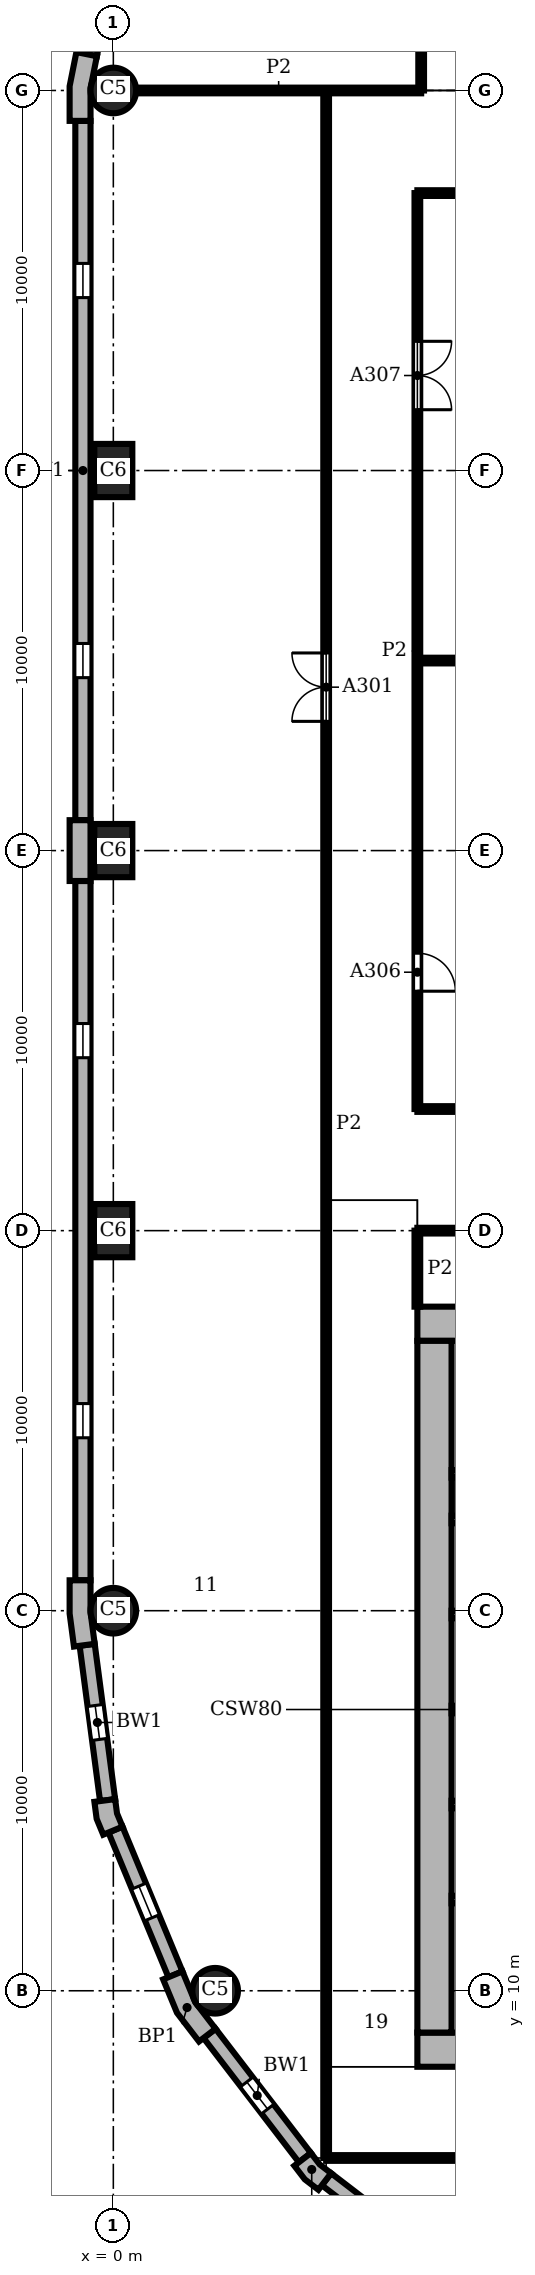
"""IFC4 building model, lengths in metres.
Left out: names, types, materials, properties, quantities, classifications, styles, units other than length and angle.
Written with IfcOpenShell. Run it as: python <this file> out.ifc"""

import sys

from ifc_helpers import new_model, si_unit, direction, frame, frame_2d, origin, origin_2d, place, context, subcontext, project, spatial, polyline, rectangle, circle, outline, extrude, element, fill, save


model = new_model("IFC4")
c1 = context("Model", 3, precision=1e-05, world=origin(), true_north=direction((0.0, 1.0)))
c2 = subcontext(c1, "Body", "Model", "MODEL_VIEW")
j1 = project(units=[si_unit("LENGTHUNIT", "METRE"), si_unit("PLANEANGLEUNIT", "RADIAN")], contexts=[c1])
p1 = place(None, origin())
s1 = spatial("IfcSite", under=j1, at=p1, CompositionType="ELEMENT")
p2 = place(p1, origin())
s2 = spatial("IfcBuilding", under=s1, at=p2, CompositionType="ELEMENT")
p3 = place(p2, frame((0.0, 0.0, 35.4)))
s3 = spatial("IfcBuildingStorey", under=s2, at=p3, CompositionType="ELEMENT", Elevation=35.4)
p4 = place(p3, frame((0.0, 60.0, 0.0), z_axis=(0.0, 0.0, 1.0), x_axis=(1.0, 0.0, 0.0)))
e1 = element("IfcColumn", 1, at=p4, inside=s3, PredefinedType="COLUMN", context=c2, shape_type="SweptSolid", body=[
    extrude(circle(Radius=0.6, at=origin_2d()), origin(), (0.0, 0.0, 1.0), 3.9),
])
for number, where, z_axis, x_axis in (
    (2, (0.0, 50.0, 0.0), (0.0, 0.0, 1.0), (0.0, 1.0, 0.0)),
    (3, (0.0, 40.0, 0.0), (0.0, 0.0, 1.0), (0.0, 1.0, 0.0)),
    (4, (0.0, 30.0, 0.0), (0.0, 0.0, 1.0), (0.0, 1.0, 0.0)),
):
    element("IfcColumn", number, at=place(p3, frame(where, z_axis=z_axis, x_axis=x_axis)), inside=s3, PredefinedType="COLUMN", context=c2, shape_type="SweptSolid", body=[
        extrude(rectangle(XDim=1.4, YDim=1.0, at=origin_2d()), origin(), (0.0, 0.0, 1.0), 3.9),
    ])
for number, where, z_axis, x_axis in (
    (5, (0.0, 20.0, 0.0), (0.0, 0.0, 1.0), (1.0, 0.0, 0.0)),
    (6, (2.679, 10.0, 0.0), (0.0, 0.0, 1.0), (1.0, 0.0, 0.0)),
):
    element("IfcColumn", number, at=place(p3, frame(where, z_axis=z_axis, x_axis=x_axis)), inside=s3, PredefinedType="COLUMN", context=c2, shape_type="SweptSolid", body=[
        extrude(circle(Radius=0.6, at=origin_2d()), origin(), (0.0, 0.0, 1.0), 3.9),
    ])
for number, where, z_axis, x_axis in (
    (7, (8.0, 8.45, 0.0), (0.0, 0.0, 1.0), (1.0, 0.0, 0.0)),
    (8, (28.0, 27.55, 0.0), (0.0, 0.0, 1.0), (-1.0, 0.0, 0.0)),
):
    element("IfcWall", number, at=place(p3, frame(where, z_axis=z_axis, x_axis=x_axis)), inside=s3, PredefinedType="SHEAR", context=c2, shape_type="SweptSolid", body=[
        extrude(rectangle(XDim=20.0, YDim=0.9, at=frame_2d((10.0, 0.0))), origin(), (0.0, 0.0, 1.0), 3.9),
    ])
p5 = place(p3, frame((8.45, 27.1, 0.0), z_axis=(0.0, 0.0, 1.0), x_axis=(0.0, -1.0, 0.0)))
e9 = element("IfcWall", 9, at=p5, inside=s3, PredefinedType="SHEAR", context=c2, shape_type="SweptSolid", body=[
    extrude(rectangle(XDim=18.2, YDim=0.9, at=frame_2d((9.1, 0.0))), origin(), (0.0, 0.0, 1.0), 3.9),
])
p6 = place(p3, origin())
e10 = element("IfcWall", 10, at=p6, inside=s3, PredefinedType="SOLIDWALL", context=c2, shape_type="SweptSolid", body=[
    extrude(outline(polyline([(-0.825, 60.98), (-0.972, 61.009), (-1.15, 60.113), (-1.15, 59.2), (-1.0, 59.2), (-0.6, 59.2), (-0.6, 60.059), (-0.432, 60.902), (-0.825, 60.98)])), origin(), (0.0, 0.0, 1.0), 3.9),
])
e11 = element("IfcWall", 11, at=p6, inside=s3, PredefinedType="SOLIDWALL", context=c2, shape_type="SweptSolid", body=[
    extrude(outline(polyline([(-1.0, 40.8), (-1.15, 40.8), (-1.15, 40.0), (-1.15, 39.2), (-1.0, 39.2), (-0.6, 39.2), (-0.6, 40.0), (-0.6, 40.8), (-1.0, 40.8)])), origin(), (0.0, 0.0, 1.0), 3.9),
])
e12 = element("IfcWall", 12, at=p6, inside=s3, PredefinedType="SOLIDWALL", context=c2, shape_type="SweptSolid", body=[
    extrude(outline(polyline([(-1.0, 20.8), (-1.15, 20.8), (-1.15, 19.925), (-1.036, 19.057), (-0.887, 19.076), (-0.49, 19.128), (-0.6, 19.961), (-0.6, 20.8), (-1.0, 20.8)])), origin(), (0.0, 0.0, 1.0), 3.9),
])
e13 = element("IfcWall", 13, at=p6, inside=s3, PredefinedType="SOLIDWALL", context=c2, shape_type="SweptSolid", body=[
    extrude(outline(polyline([(-0.349, 14.99), (-0.498, 14.971), (-0.439, 14.523), (-0.266, 14.106), (-0.128, 14.164), (0.242, 14.317), (0.097, 14.667), (0.047, 15.043), (-0.349, 14.99)])), origin(), (0.0, 0.0, 1.0), 3.9),
])
e14 = element("IfcWall", 14, at=p6, inside=s3, PredefinedType="SOLIDWALL", context=c2, shape_type="SweptSolid", body=[
    extrude(outline(polyline([(1.449, 10.356), (1.311, 10.299), (1.675, 9.42), (2.254, 8.665), (2.373, 8.757), (2.69, 9.0), (2.155, 9.698), (1.819, 10.51), (1.449, 10.356)])), origin(), (0.0, 0.0, 1.0), 3.9),
])
e15 = element("IfcWall", 15, at=p6, inside=s3, PredefinedType="SOLIDWALL", context=c2, shape_type="SweptSolid", body=[
    extrude(outline(polyline([(4.882, 5.487), (4.763, 5.396), (5.038, 5.038), (5.396, 4.763), (5.487, 4.882), (5.731, 5.199), (5.43, 5.43), (5.199, 5.731), (4.882, 5.487)])), origin(), (0.0, 0.0, 1.0), 3.9),
])
p7 = place(p3, frame((0.299, 65.602, 0.0), z_axis=(0.0, 0.0, 1.0), x_axis=(-0.195098533057, -0.98078364709, 0.0)))
e16 = element("IfcWall", 16, at=p7, inside=s3, PredefinedType="SOLIDWALL", context=c2, shape_type="SweptSolid", body=[
    extrude(rectangle(XDim=4.753, YDim=0.4, at=frame_2d((2.376, 0.0))), origin(), (0.0, 0.0, 1.0), 3.9),
])
p8 = place(p7, frame((0.226, 0.0, 0.9)))
e17 = element("IfcOpeningElement", 17, at=p8, cuts=e16, PredefinedType="OPENING", context=c2, shape_type="SweptSolid", body=[
    extrude(rectangle(XDim=4.3, YDim=2.35, at=frame_2d((2.15, 1.175))), frame((0.0, 0.21, 0.0), z_axis=(0.0, -1.0, 0.0), x_axis=(1.0, 0.0, 0.0)), (0.0, 0.0, 1.0), 0.42),
])
p9 = place(p3, frame((-0.8, 59.2, 0.0), z_axis=(0.0, 0.0, 1.0), x_axis=(0.0, -1.0, 0.0)))
e18 = element("IfcWall", 18, at=p9, inside=s3, PredefinedType="SOLIDWALL", context=c2, shape_type="SweptSolid", body=[
    extrude(rectangle(XDim=18.4, YDim=0.4, at=frame_2d((9.2, 0.0))), origin(), (0.0, 0.0, 1.0), 3.9),
])
p10 = place(p9, frame((3.75, 0.0, 0.9)))
e19 = element("IfcOpeningElement", 19, at=p10, cuts=e18, PredefinedType="OPENING", context=c2, shape_type="SweptSolid", body=[
    extrude(rectangle(XDim=0.9, YDim=2.35, at=frame_2d((0.45, 1.175))), frame((0.0, 0.21, 0.0), z_axis=(0.0, -1.0, 0.0), x_axis=(1.0, 0.0, 0.0)), (0.0, 0.0, 1.0), 0.42),
])
p11 = place(p9, frame((13.75, 0.0, 0.9)))
e20 = element("IfcOpeningElement", 20, at=p11, cuts=e18, PredefinedType="OPENING", context=c2, shape_type="SweptSolid", body=[
    extrude(rectangle(XDim=0.9, YDim=2.35, at=frame_2d((0.45, 1.175))), frame((0.0, 0.21, 0.0), z_axis=(0.0, -1.0, 0.0), x_axis=(1.0, 0.0, 0.0)), (0.0, 0.0, 1.0), 0.42),
])
p12 = place(p3, frame((-0.8, 39.2, 0.0), z_axis=(0.0, 0.0, 1.0), x_axis=(0.0, -1.0, 0.0)))
e21 = element("IfcWall", 21, at=p12, inside=s3, PredefinedType="SOLIDWALL", context=c2, shape_type="SweptSolid", body=[
    extrude(rectangle(XDim=18.4, YDim=0.4, at=frame_2d((9.2, 0.0))), origin(), (0.0, 0.0, 1.0), 3.9),
])
p13 = place(p12, frame((3.75, 0.0, 0.9)))
e22 = element("IfcOpeningElement", 22, at=p13, cuts=e21, PredefinedType="OPENING", context=c2, shape_type="SweptSolid", body=[
    extrude(rectangle(XDim=0.9, YDim=2.35, at=frame_2d((0.45, 1.175))), frame((0.0, 0.21, 0.0), z_axis=(0.0, -1.0, 0.0), x_axis=(1.0, 0.0, 0.0)), (0.0, 0.0, 1.0), 0.42),
])
p14 = place(p12, frame((13.75, 0.0, 0.9)))
e23 = element("IfcOpeningElement", 23, at=p14, cuts=e21, PredefinedType="OPENING", context=c2, shape_type="SweptSolid", body=[
    extrude(rectangle(XDim=0.9, YDim=2.35, at=frame_2d((0.45, 1.175))), frame((0.0, 0.21, 0.0), z_axis=(0.0, -1.0, 0.0), x_axis=(1.0, 0.0, 0.0)), (0.0, 0.0, 1.0), 0.42),
])
p15 = place(p3, frame((-0.689, 19.102, 0.0), z_axis=(0.0, 0.0, 1.0), x_axis=(0.130514280502, -0.991446429508, 0.0)))
e24 = element("IfcWall", 24, at=p15, inside=s3, PredefinedType="SOLIDWALL", context=c2, shape_type="SweptSolid", body=[
    extrude(rectangle(XDim=4.121, YDim=0.4, at=frame_2d((2.061, 0.0))), origin(), (0.0, 0.0, 1.0), 3.9),
])
p16 = place(p15, frame((1.611, 0.0, 0.9)))
e25 = element("IfcOpeningElement", 25, at=p16, cuts=e24, PredefinedType="OPENING", context=c2, shape_type="SweptSolid", body=[
    extrude(rectangle(XDim=0.9, YDim=2.35, at=frame_2d((0.45, 1.175))), frame((0.0, 0.21, 0.0), z_axis=(0.0, -1.0, 0.0), x_axis=(1.0, 0.0, 0.0)), (0.0, 0.0, 1.0), 0.42),
])
p17 = place(p3, frame((0.057, 14.24, 0.0), z_axis=(0.0, 0.0, 1.0), x_axis=(0.382721546029, -0.923863744394, 0.0)))
e26 = element("IfcWall", 26, at=p17, inside=s3, PredefinedType="SOLIDWALL", context=c2, shape_type="SweptSolid", body=[
    extrude(rectangle(XDim=4.121, YDim=0.4, at=frame_2d((2.061, 0.0))), origin(), (0.0, 0.0, 1.0), 3.9),
])
p18 = place(p17, frame((1.611, 0.0, 0.9)))
e27 = element("IfcOpeningElement", 27, at=p18, cuts=e26, PredefinedType="OPENING", context=c2, shape_type="SweptSolid", body=[
    extrude(rectangle(XDim=0.9, YDim=2.35, at=frame_2d((0.45, 1.175))), frame((0.0, 0.21, 0.0), z_axis=(0.0, -1.0, 0.0), x_axis=(1.0, 0.0, 0.0)), (0.0, 0.0, 1.0), 0.42),
])
p19 = place(p3, frame((2.532, 8.878, 0.0), z_axis=(0.0, 0.0, 1.0), x_axis=(0.608759824817, -0.793354571229, 0.0)))
e28 = element("IfcWall", 28, at=p19, inside=s3, PredefinedType="SOLIDWALL", context=c2, shape_type="SweptSolid", body=[
    extrude(rectangle(XDim=4.121, YDim=0.4, at=frame_2d((2.061, 0.0))), origin(), (0.0, 0.0, 1.0), 3.9),
])
p20 = place(p19, frame((1.611, 0.0, 0.9)))
e29 = element("IfcOpeningElement", 29, at=p20, cuts=e28, PredefinedType="OPENING", context=c2, shape_type="SweptSolid", body=[
    extrude(rectangle(XDim=0.9, YDim=2.35, at=frame_2d((0.45, 1.175))), frame((0.0, 0.21, 0.0), z_axis=(0.0, -1.0, 0.0), x_axis=(1.0, 0.0, 0.0)), (0.0, 0.0, 1.0), 0.42),
])
p21 = place(p3, frame((5.609, 5.041, 0.0), z_axis=(0.0, 0.0, 1.0), x_axis=(0.793354571229, -0.608759824817, 0.0)))
e30 = element("IfcWall", 30, at=p21, inside=s3, PredefinedType="SOLIDWALL", context=c2, shape_type="SweptSolid", body=[
    extrude(rectangle(XDim=4.121, YDim=0.4, at=frame_2d((2.061, 0.0))), origin(), (0.0, 0.0, 1.0), 3.9),
])
p22 = place(p21, frame((1.611, 0.0, 0.9)))
e31 = element("IfcOpeningElement", 31, at=p22, cuts=e30, PredefinedType="OPENING", context=c2, shape_type="SweptSolid", body=[
    extrude(rectangle(XDim=0.9, YDim=2.35, at=frame_2d((0.45, 1.175))), frame((0.0, 0.21, 0.0), z_axis=(0.0, -1.0, 0.0), x_axis=(1.0, 0.0, 0.0)), (0.0, 0.0, 1.0), 0.42),
])
p23 = place(p3, frame((8.9, 12.4, 0.0), z_axis=(0.0, 0.0, 1.0), x_axis=(1.0, 0.0, 0.0)))
e32 = element("IfcWall", 32, at=p23, inside=s3, PredefinedType="SHEAR", context=c2, shape_type="SweptSolid", body=[
    extrude(rectangle(XDim=4.9, YDim=0.2, at=frame_2d((2.45, 0.0))), origin(), (0.0, 0.0, 1.0), 3.58),
])
for number, where, z_axis, x_axis in (
    (33, (8.9, 14.9, 0.0), (0.0, 0.0, 1.0), (1.0, 0.0, 0.0)),
    (34, (8.9, 17.4, 0.0), (0.0, 0.0, 1.0), (1.0, 0.0, 0.0)),
    (35, (8.9, 19.9, 0.0), (0.0, 0.0, 1.0), (1.0, 0.0, 0.0)),
    (36, (8.9, 22.4, 0.0), (0.0, 0.0, 1.0), (1.0, 0.0, 0.0)),
):
    element("IfcWall", number, at=place(p3, frame(where, z_axis=z_axis, x_axis=x_axis)), inside=s3, PredefinedType="SHEAR", context=c2, shape_type="SweptSolid", body=[
        extrude(rectangle(XDim=2.8, YDim=0.2, at=frame_2d((1.4, 0.0))), origin(), (0.0, 0.0, 1.0), 3.58),
    ])
p24 = place(p3, frame((8.9, 23.6, 0.0), z_axis=(0.0, 0.0, 1.0), x_axis=(1.0, 0.0, 0.0)))
e37 = element("IfcWall", 37, at=p24, inside=s3, PredefinedType="SHEAR", context=c2, shape_type="SweptSolid", body=[
    extrude(rectangle(XDim=4.9, YDim=0.2, at=frame_2d((2.45, 0.0))), origin(), (0.0, 0.0, 1.0), 3.58),
])
p25 = place(p3, frame((5.6, 5.6, 0.0), z_axis=(0.0, 0.0, 1.0), x_axis=(0.0, 1.0, 0.0)))
e38 = element("IfcWall", 38, at=p25, inside=s3, PredefinedType="PARTITIONING", context=c2, shape_type="SweptSolid", body=[
    extrude(rectangle(XDim=54.4, YDim=0.15, at=frame_2d((27.2, 0.0))), origin(), (0.0, 0.0, 1.0), 3.58),
])
p26 = place(p25, frame((37.8, 0.0, 0.0)))
e39 = element("IfcOpeningElement", 39, at=p26, cuts=e38, PredefinedType="OPENING", context=c2, shape_type="SweptSolid", body=[
    extrude(rectangle(XDim=1.8, YDim=2.1, at=frame_2d((0.9, 1.05))), frame((0.0, 0.085, 0.0), z_axis=(0.0, -1.0, 0.0), x_axis=(1.0, 0.0, 0.0)), (0.0, 0.0, 1.0), 0.17),
])
p27 = place(p3, frame((8.0, 28.0, 0.0), z_axis=(0.0, 0.0, 1.0), x_axis=(0.0, 1.0, 0.0)))
e40 = element("IfcWall", 40, at=p27, inside=s3, PredefinedType="PARTITIONING", context=c2, shape_type="SweptSolid", body=[
    extrude(rectangle(XDim=2.0, YDim=0.15, at=frame_2d((1.0, 0.0))), origin(), (0.0, 0.0, 1.0), 3.58),
])
p28 = place(p3, frame((8.0, 33.2, 0.0), z_axis=(0.0, 0.0, 1.0), x_axis=(0.0, 1.0, 0.0)))
e41 = element("IfcWall", 41, at=p28, inside=s3, PredefinedType="PARTITIONING", context=c2, shape_type="SweptSolid", body=[
    extrude(rectangle(XDim=24.1, YDim=0.15, at=frame_2d((12.05, 0.0))), origin(), (0.0, 0.0, 1.0), 3.58),
])
p29 = place(p28, frame((3.1, 0.0, 0.0)))
e42 = element("IfcOpeningElement", 42, at=p29, cuts=e41, PredefinedType="OPENING", context=c2, shape_type="SweptSolid", body=[
    extrude(rectangle(XDim=1.0, YDim=2.1, at=frame_2d((0.5, 1.05))), frame((0.0, 0.085, 0.0), z_axis=(0.0, -1.0, 0.0), x_axis=(1.0, 0.0, 0.0)), (0.0, 0.0, 1.0), 0.17),
])
p30 = place(p28, frame((18.4, 0.0, 0.0)))
e43 = element("IfcOpeningElement", 43, at=p30, cuts=e41, PredefinedType="OPENING", context=c2, shape_type="SweptSolid", body=[
    extrude(rectangle(XDim=1.8, YDim=2.1, at=frame_2d((0.9, 1.05))), frame((0.0, 0.085, 0.0), z_axis=(0.0, -1.0, 0.0), x_axis=(1.0, 0.0, 0.0)), (0.0, 0.0, 1.0), 0.17),
])
p31 = place(p3, frame((8.1, 60.0, 0.0), z_axis=(0.0, 0.0, 1.0), x_axis=(0.0, 1.0, 0.0)))
e44 = element("IfcWall", 44, at=p31, inside=s3, PredefinedType="PARTITIONING", context=c2, shape_type="SweptSolid", body=[
    extrude(rectangle(XDim=6.4, YDim=0.15, at=frame_2d((3.2, 0.0))), origin(), (0.0, 0.0, 1.0), 3.58),
])
p32 = place(p31, frame((3.1, 0.0, 0.0)))
e45 = element("IfcOpeningElement", 45, at=p32, cuts=e44, PredefinedType="OPENING", context=c2, shape_type="SweptSolid", body=[
    extrude(rectangle(XDim=1.8, YDim=2.1, at=frame_2d((0.9, 1.05))), frame((0.0, 0.085, 0.0), z_axis=(0.0, -1.0, 0.0), x_axis=(1.0, 0.0, 0.0)), (0.0, 0.0, 1.0), 0.17),
])
p33 = place(p3, frame((5.6, 5.6, 0.0), z_axis=(0.0, 0.0, 1.0), x_axis=(1.0, 0.0, 0.0)))
e46 = element("IfcWall", 46, at=p33, inside=s3, PredefinedType="PARTITIONING", context=c2, shape_type="SweptSolid", body=[
    extrude(rectangle(XDim=25.4, YDim=0.15, at=frame_2d((12.7, 0.0))), origin(), (0.0, 0.0, 1.0), 3.58),
])
p34 = place(p3, frame((8.0, 30.0, 0.0), z_axis=(0.0, 0.0, 1.0), x_axis=(1.0, 0.0, 0.0)))
e47 = element("IfcWall", 47, at=p34, inside=s3, PredefinedType="PARTITIONING", context=c2, shape_type="SweptSolid", body=[
    extrude(rectangle(XDim=1.2, YDim=0.15, at=frame_2d((0.6, 0.0))), origin(), (0.0, 0.0, 1.0), 3.58),
])
for number, where, z_axis, x_axis in (
    (48, (8.0, 33.2, 0.0), (0.0, 0.0, 1.0), (1.0, 0.0, 0.0)),
    (49, (8.0, 45.0, 0.0), (0.0, 0.0, 1.0), (1.0, 0.0, 0.0)),
    (50, (8.0, 57.3, 0.0), (0.0, 0.0, 1.0), (1.0, 0.0, 0.0)),
):
    element("IfcWall", number, at=place(p3, frame(where, z_axis=z_axis, x_axis=x_axis)), inside=s3, PredefinedType="PARTITIONING", context=c2, shape_type="SweptSolid", body=[
        extrude(rectangle(XDim=5.8, YDim=0.15, at=frame_2d((2.9, 0.0))), origin(), (0.0, 0.0, 1.0), 3.58),
    ])
p35 = place(p3, frame((0.6, 60.0, 0.0), z_axis=(0.0, 0.0, 1.0), x_axis=(1.0, 0.0, 0.0)))
e51 = element("IfcWall", 51, at=p35, inside=s3, PredefinedType="PARTITIONING", context=c2, shape_type="SweptSolid", body=[
    extrude(rectangle(XDim=7.5, YDim=0.15, at=frame_2d((3.75, 0.0))), origin(), (0.0, 0.0, 1.0), 3.58),
])
p36 = place(p10, origin())
e52 = element("IfcWindow", 52, at=p36, inside=s3, PartitioningType="SINGLE_PANEL", PredefinedType="WINDOW", context=c2, shape_type="SweptSolid", body=[
    extrude(rectangle(XDim=0.9, YDim=2.35, at=frame_2d((0.45, 1.175))), frame((0.0, 0.16, 0.0), z_axis=(0.0, -1.0, 0.0), x_axis=(1.0, 0.0, 0.0)), (0.0, 0.0, 1.0), 0.06),
])
fill(e19, e52)
p37 = place(p11, origin())
e53 = element("IfcWindow", 53, at=p37, inside=s3, PartitioningType="SINGLE_PANEL", PredefinedType="WINDOW", context=c2, shape_type="SweptSolid", body=[
    extrude(rectangle(XDim=0.9, YDim=2.35, at=frame_2d((0.45, 1.175))), frame((0.0, 0.16, 0.0), z_axis=(0.0, -1.0, 0.0), x_axis=(1.0, 0.0, 0.0)), (0.0, 0.0, 1.0), 0.06),
])
fill(e20, e53)
p38 = place(p13, origin())
e54 = element("IfcWindow", 54, at=p38, inside=s3, PartitioningType="SINGLE_PANEL", PredefinedType="WINDOW", context=c2, shape_type="SweptSolid", body=[
    extrude(rectangle(XDim=0.9, YDim=2.35, at=frame_2d((0.45, 1.175))), frame((0.0, 0.16, 0.0), z_axis=(0.0, -1.0, 0.0), x_axis=(1.0, 0.0, 0.0)), (0.0, 0.0, 1.0), 0.06),
])
fill(e22, e54)
p39 = place(p14, origin())
e55 = element("IfcWindow", 55, at=p39, inside=s3, PartitioningType="SINGLE_PANEL", PredefinedType="WINDOW", context=c2, shape_type="SweptSolid", body=[
    extrude(rectangle(XDim=0.9, YDim=2.35, at=frame_2d((0.45, 1.175))), frame((0.0, 0.16, 0.0), z_axis=(0.0, -1.0, 0.0), x_axis=(1.0, 0.0, 0.0)), (0.0, 0.0, 1.0), 0.06),
])
fill(e23, e55)
p40 = place(p16, origin())
e56 = element("IfcWindow", 56, at=p40, inside=s3, PartitioningType="SINGLE_PANEL", PredefinedType="WINDOW", context=c2, shape_type="SweptSolid", body=[
    extrude(rectangle(XDim=0.9, YDim=2.35, at=frame_2d((0.45, 1.175))), frame((0.0, 0.16, 0.0), z_axis=(0.0, -1.0, 0.0), x_axis=(1.0, 0.0, 0.0)), (0.0, 0.0, 1.0), 0.06),
])
fill(e25, e56)
p41 = place(p18, origin())
e57 = element("IfcWindow", 57, at=p41, inside=s3, PartitioningType="SINGLE_PANEL", PredefinedType="WINDOW", context=c2, shape_type="SweptSolid", body=[
    extrude(rectangle(XDim=0.9, YDim=2.35, at=frame_2d((0.45, 1.175))), frame((0.0, 0.16, 0.0), z_axis=(0.0, -1.0, 0.0), x_axis=(1.0, 0.0, 0.0)), (0.0, 0.0, 1.0), 0.06),
])
fill(e27, e57)
p42 = place(p20, origin())
e58 = element("IfcWindow", 58, at=p42, inside=s3, PartitioningType="SINGLE_PANEL", PredefinedType="WINDOW", context=c2, shape_type="SweptSolid", body=[
    extrude(rectangle(XDim=0.9, YDim=2.35, at=frame_2d((0.45, 1.175))), frame((0.0, 0.16, 0.0), z_axis=(0.0, -1.0, 0.0), x_axis=(1.0, 0.0, 0.0)), (0.0, 0.0, 1.0), 0.06),
])
fill(e29, e58)
p43 = place(p26, origin())
e59 = element("IfcDoor", 59, at=p43, inside=s3, OperationType="DOUBLE_DOOR_SINGLE_SWING", PredefinedType="DOOR", context=c2, shape_type="SweptSolid", body=[
    extrude(rectangle(XDim=1.8, YDim=2.1, at=frame_2d((0.9, 1.05))), frame((0.0, 0.025, 0.0), z_axis=(0.0, -1.0, 0.0), x_axis=(1.0, 0.0, 0.0)), (0.0, 0.0, 1.0), 0.05),
])
fill(e39, e59)
p44 = place(p29, frame((1.0, 0.0, 0.0), z_axis=(0.0, 0.0, 1.0), x_axis=(-1.0, 0.0, 0.0)))
e60 = element("IfcDoor", 60, at=p44, inside=s3, OperationType="SINGLE_SWING_RIGHT", PredefinedType="DOOR", context=c2, shape_type="SweptSolid", body=[
    extrude(rectangle(XDim=1.0, YDim=2.1, at=frame_2d((0.5, 1.05))), frame((0.0, 0.025, 0.0), z_axis=(0.0, -1.0, 0.0), x_axis=(1.0, 0.0, 0.0)), (0.0, 0.0, 1.0), 0.05),
])
fill(e42, e60)
p45 = place(p30, frame((1.8, 0.0, 0.0), z_axis=(0.0, 0.0, 1.0), x_axis=(-1.0, 0.0, 0.0)))
e61 = element("IfcDoor", 61, at=p45, inside=s3, OperationType="DOUBLE_DOOR_SINGLE_SWING", PredefinedType="DOOR", context=c2, shape_type="SweptSolid", body=[
    extrude(rectangle(XDim=1.8, YDim=2.1, at=frame_2d((0.9, 1.05))), frame((0.0, 0.025, 0.0), z_axis=(0.0, -1.0, 0.0), x_axis=(1.0, 0.0, 0.0)), (0.0, 0.0, 1.0), 0.05),
])
fill(e43, e61)
save(model, sys.argv[1])
